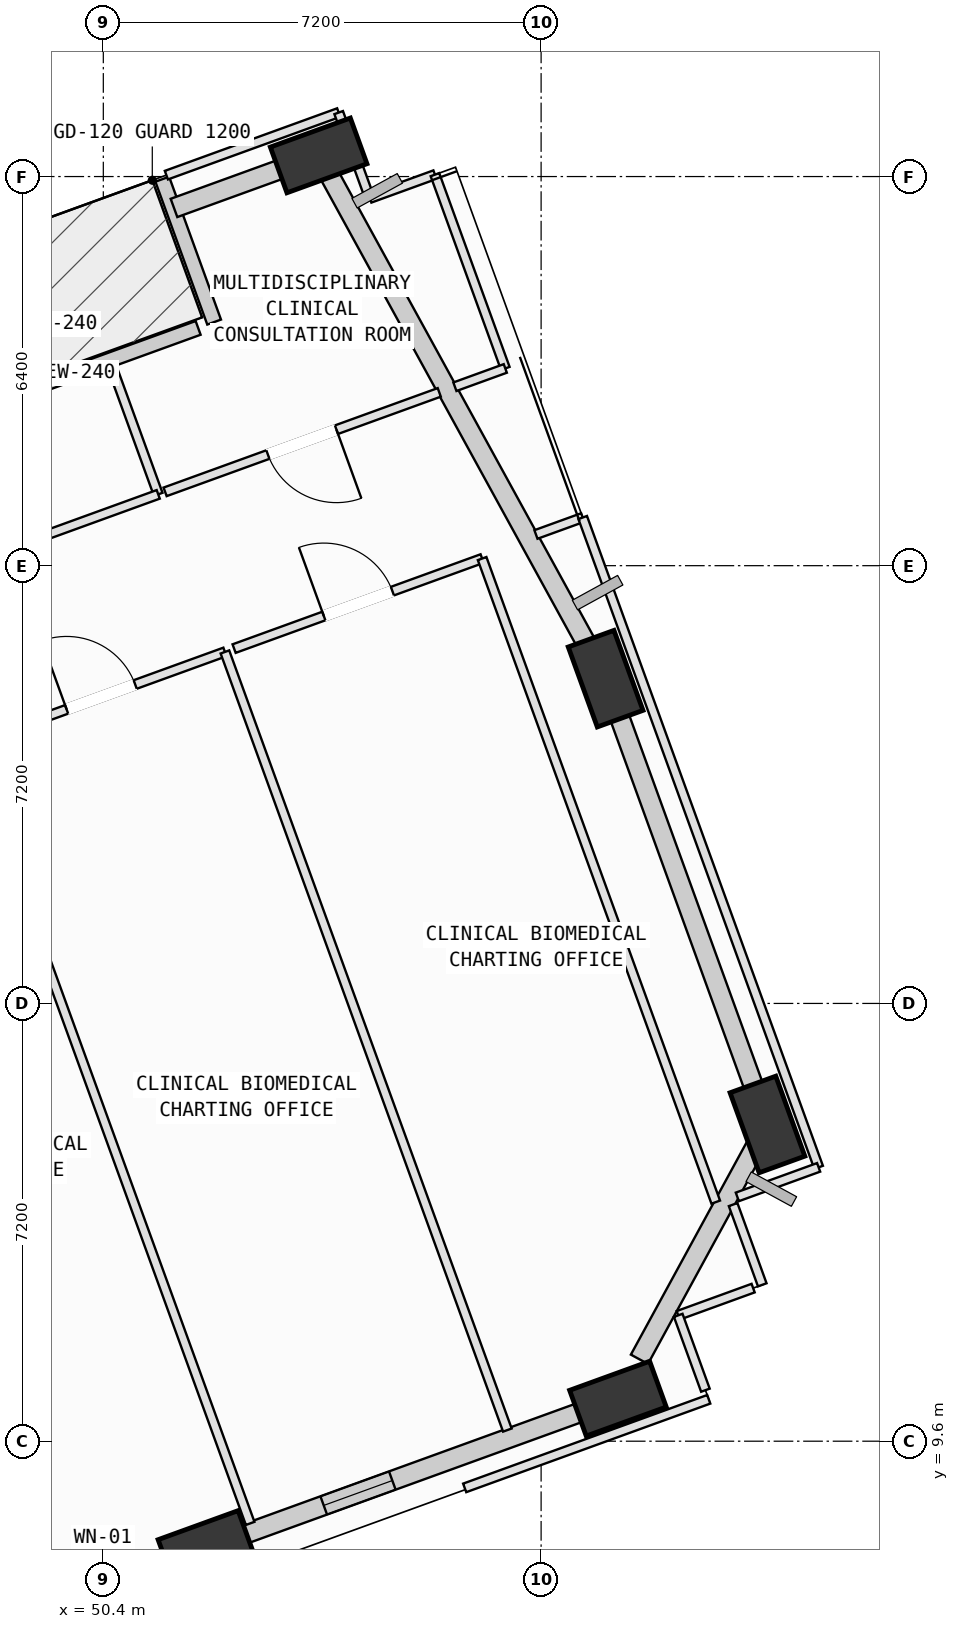
"""IFC4 building model, lengths in metres.
Left out: names, types, materials, properties, quantities, classifications, styles, units other than length and angle.
Written with IfcOpenShell. Run it as: python <this file> out.ifc"""

import sys

from ifc_helpers import new_model, si_unit, direction, frame, frame_2d, origin, origin_2d, place, context, subcontext, project, spatial, rectangle, extrude, element, fill, save


model = new_model("IFC4")
c1 = context("Model", 3, precision=1e-05, world=origin(), true_north=direction((0.0, 1.0)))
c2 = subcontext(c1, "Body", "Model", "MODEL_VIEW")
j1 = project(units=[si_unit("LENGTHUNIT", "METRE"), si_unit("PLANEANGLEUNIT", "RADIAN")], contexts=[c1])
p1 = place(None, origin())
s1 = spatial("IfcSite", under=j1, at=p1, CompositionType="ELEMENT")
p2 = place(p1, origin())
s2 = spatial("IfcBuilding", under=s1, at=p2, CompositionType="ELEMENT")
p3 = place(p2, frame((0.0, 0.0, 108.4)))
s3 = spatial("IfcBuildingStorey", under=s2, at=p3, CompositionType="ELEMENT", Elevation=108.4)
p4 = place(p3, frame((52.096, 7.843, 0.002), z_axis=(0.069270333832, 0.076805001722, 0.994636924994), x_axis=(-0.925321067949, 0.377538817765, 0.03528969099)))
e1 = element("IfcColumn", 1, at=p4, inside=s3, PredefinedType="COLUMN", context=c2, shape_type="SweptSolid", body=[
    extrude(rectangle(XDim=1.4, YDim=0.8, at=origin_2d()), origin(), (0.0, 0.0, 1.0), 4.018),
])
p5 = place(p3, frame((58.864, 10.3, 0.002), z_axis=(0.058831075792, 0.104440322179, 0.992789566638), x_axis=(-0.985243313153, 0.166201162188, 0.040899725852)))
e2 = element("IfcColumn", 2, at=p5, inside=s3, PredefinedType="COLUMN", context=c2, shape_type="SweptSolid", body=[
    extrude(rectangle(XDim=1.4, YDim=0.8, at=origin_2d()), origin(), (0.0, 0.0, 1.0), 4.025),
])
p6 = place(p3, frame((61.323, 14.81, 0.002), z_axis=(0.04014383957, 0.114428134848, 0.992620105629), x_axis=(0.013083017685, -0.993395925555, 0.113988463181)))
e3 = element("IfcColumn", 3, at=p6, inside=s3, PredefinedType="COLUMN", context=c2, shape_type="SweptSolid", body=[
    extrude(rectangle(XDim=1.4, YDim=0.8, at=origin_2d()), origin(), (0.0, 0.0, 1.0), 4.026),
])
p7 = place(p3, frame((58.661, 22.141, 0.002), z_axis=(0.010086228897, 0.103414226406, 0.994587233863), x_axis=(0.248836012635, -0.96360846528, 0.097669670096)))
e4 = element("IfcColumn", 4, at=p7, inside=s3, PredefinedType="COLUMN", context=c2, shape_type="SweptSolid", body=[
    extrude(rectangle(XDim=1.4, YDim=0.8, at=origin_2d()), origin(), (0.0, 0.0, 1.0), 4.018),
])
p8 = place(p3, frame((53.941, 30.748, 0.002), z_axis=(-0.025255510394, 0.083799609187, 0.996162529257), x_axis=(-0.801926584814, -0.596675766254, 0.029862728171)))
e5 = element("IfcColumn", 5, at=p8, inside=s3, PredefinedType="COLUMN", context=c2, shape_type="SweptSolid", body=[
    extrude(rectangle(XDim=1.4, YDim=0.8, at=origin_2d()), origin(), (0.0, 0.0, 1.0), 4.012),
])
p9 = place(p3, frame((45.417, 25.536, 0.0), z_axis=(0.0, 0.0, 1.0), x_axis=(0.939988887758, 0.341205056955, 0.0)))
e6 = element("IfcWall", 6, at=p9, inside=s3, PredefinedType="SOLIDWALL", context=c2, shape_type="SweptSolid", body=[
    extrude(rectangle(XDim=6.96, YDim=0.24, at=frame_2d((3.48, 0.0))), origin(), (0.0, 0.0, 1.0), 2.945),
])
p10 = place(p9, frame((2.263, 0.0, 0.0)))
e7 = element("IfcOpeningElement", 7, at=p10, cuts=e6, PredefinedType="OPENING", context=c2, shape_type="SweptSolid", body=[
    extrude(rectangle(XDim=1.1, YDim=2.15, at=frame_2d((0.55, 1.075))), frame((0.0, 0.13, 0.0), z_axis=(0.0, -1.0, 0.0), x_axis=(1.0, 0.0, 0.0)), (0.0, 0.0, 1.0), 0.26),
])
p11 = place(p3, frame((52.222, 28.006, 0.0), z_axis=(0.0, 0.0, 1.0), x_axis=(-0.341194160902, 0.939992842827, 0.0)))
e8 = element("IfcWall", 8, at=p11, inside=s3, PredefinedType="SOLIDWALL", context=c2, shape_type="SweptSolid", body=[
    extrude(rectangle(XDim=2.5, YDim=0.24, at=frame_2d((1.25, 0.0))), origin(), (0.0, 0.0, 1.0), 3.165),
])
p12 = place(p3, frame((51.811, 7.74, 0.0), z_axis=(0.0, 0.0, 1.0), x_axis=(-0.939992730325, -0.341194470846, 0.0)))
e9 = element("IfcWall", 9, at=p12, inside=s3, PredefinedType="SOLIDWALL", context=c2, shape_type="SweptSolid", body=[
    extrude(rectangle(XDim=6.218, YDim=0.32, at=frame_2d((3.109, 0.0))), origin(), (0.0, 0.0, 1.0), 3.165),
])
p13 = place(p12, frame((0.708, 0.0, 0.75)))
e10 = element("IfcOpeningElement", 10, at=p13, cuts=e9, PredefinedType="OPENING", context=c2, shape_type="SweptSolid", body=[
    extrude(rectangle(XDim=1.6, YDim=1.95, at=frame_2d((0.8, 0.975))), frame((0.0, 0.17, 0.0), z_axis=(0.0, -1.0, 0.0), x_axis=(1.0, 0.0, 0.0)), (0.0, 0.0, 1.0), 0.34),
])
p14 = place(p3, frame((58.593, 10.202, 0.0), z_axis=(0.0, 0.0, 1.0), x_axis=(-0.939989678863, -0.341202877524, 0.0)))
e11 = element("IfcWall", 11, at=p14, inside=s3, PredefinedType="SOLIDWALL", context=c2, shape_type="SweptSolid", body=[
    extrude(rectangle(XDim=6.242, YDim=0.32, at=frame_2d((3.121, 0.0))), origin(), (0.0, 0.0, 1.0), 3.165),
])
p15 = place(p14, frame((3.66, 0.0, 0.75)))
e12 = element("IfcOpeningElement", 12, at=p15, cuts=e11, PredefinedType="OPENING", context=c2, shape_type="SweptSolid", body=[
    extrude(rectangle(XDim=1.2, YDim=1.75, at=frame_2d((0.6, 0.875))), frame((0.0, 0.17, 0.0), z_axis=(0.0, -1.0, 0.0), x_axis=(1.0, 0.0, 0.0)), (0.0, 0.0, 1.0), 0.34),
])
p16 = place(p3, frame((61.201, 14.587, 0.0), z_axis=(0.0, 0.0, 1.0), x_axis=(-0.478691175665, -0.877983347417, 0.0)))
e13 = element("IfcWall", 13, at=p16, inside=s3, PredefinedType="SOLIDWALL", context=c2, shape_type="SweptSolid", body=[
    extrude(rectangle(XDim=4.145, YDim=0.32, at=frame_2d((2.073, 0.0))), origin(), (0.0, 0.0, 1.0), 3.165),
])
p17 = place(p3, frame((58.763, 21.86, 0.0), z_axis=(0.0, 0.0, 1.0), x_axis=(0.341195615614, -0.939992314802, 0.0)))
e14 = element("IfcWall", 14, at=p17, inside=s3, PredefinedType="SOLIDWALL", context=c2, shape_type="SweptSolid", body=[
    extrude(rectangle(XDim=6.84, YDim=0.32, at=frame_2d((3.42, 0.0))), origin(), (0.0, 0.0, 1.0), 3.165),
])
p18 = place(p3, frame((54.097, 30.464, 0.0), z_axis=(0.0, 0.0, 1.0), x_axis=(0.480836721767, -0.876810154481, 0.0)))
e15 = element("IfcWall", 15, at=p18, inside=s3, PredefinedType="SOLIDWALL", context=c2, shape_type="SweptSolid", body=[
    extrude(rectangle(XDim=8.838, YDim=0.32, at=frame_2d((4.419, 0.0))), origin(), (0.0, 0.0, 1.0), 3.165),
])
p19 = place(p3, frame((51.562, 29.884, 0.0), z_axis=(0.0, 0.0, 1.0), x_axis=(0.939992364917, 0.341195477547, 0.0)))
e16 = element("IfcWall", 16, at=p19, inside=s3, PredefinedType="SOLIDWALL", context=c2, shape_type="SweptSolid", body=[
    extrude(rectangle(XDim=2.076, YDim=0.32, at=frame_2d((1.038, 0.0))), origin(), (0.0, 0.0, 1.0), 2.945),
])
p20 = place(p3, frame((48.17, 21.046, 0.0), z_axis=(0.0, 0.0, 1.0), x_axis=(0.341175718881, -0.93999953662, 0.0)))
e17 = element("IfcWall", 17, at=p20, inside=s3, PredefinedType="PARTITIONING", context=c2, shape_type="SweptSolid", body=[
    extrude(rectangle(XDim=13.615, YDim=0.15, at=frame_2d((6.807, 0.0))), origin(), (0.0, 0.0, 1.0), 3.78),
])
p21 = place(p3, frame((52.804, 7.856, 0.0), z_axis=(0.0, 0.0, 1.0), x_axis=(-0.940027533904, -0.341098571534, 0.0)))
e18 = element("IfcWall", 18, at=p21, inside=s3, PredefinedType="PARTITIONING", context=c2, shape_type="SweptSolid", body=[
    extrude(rectangle(XDim=0.973, YDim=0.15, at=frame_2d((0.487, 0.0))), origin(), (0.0, 0.0, 1.0), 3.165),
])
p22 = place(p3, frame((48.321, 21.101, 0.0), z_axis=(0.0, 0.0, 1.0), x_axis=(0.940033040483, 0.341083395667, 0.0)))
e19 = element("IfcWall", 19, at=p22, inside=s3, PredefinedType="PARTITIONING", context=c2, shape_type="SweptSolid", body=[
    extrude(rectangle(XDim=4.339, YDim=0.15, at=frame_2d((2.169, 0.0))), origin(), (0.0, 0.0, 1.0), 3.78),
])
p23 = place(p22, frame((1.57, 0.0, 0.0)))
e20 = element("IfcOpeningElement", 20, at=p23, cuts=e19, PredefinedType="OPENING", context=c2, shape_type="SweptSolid", body=[
    extrude(rectangle(XDim=1.2, YDim=2.15, at=frame_2d((0.6, 1.075))), frame((0.0, 0.085, 0.0), z_axis=(0.0, -1.0, 0.0), x_axis=(1.0, 0.0, 0.0)), (0.0, 0.0, 1.0), 0.17),
])
p24 = place(p3, frame((52.4, 22.581, 0.0), z_axis=(0.0, 0.0, 1.0), x_axis=(0.341169968064, -0.940001623877, 0.0)))
e21 = element("IfcWall", 21, at=p24, inside=s3, PredefinedType="PARTITIONING", context=c2, shape_type="SweptSolid", body=[
    extrude(rectangle(XDim=13.615, YDim=0.15, at=frame_2d((6.808, 0.0))), origin(), (0.0, 0.0, 1.0), 3.78),
])
p25 = place(p3, frame((52.551, 22.636, 0.0), z_axis=(0.0, 0.0, 1.0), x_axis=(0.939960863027, 0.341282252656, 0.0)))
e22 = element("IfcWall", 22, at=p25, inside=s3, PredefinedType="PARTITIONING", context=c2, shape_type="SweptSolid", body=[
    extrude(rectangle(XDim=4.339, YDim=0.15, at=frame_2d((2.17, 0.0))), origin(), (0.0, 0.0, 1.0), 3.78),
])
p26 = place(p25, frame((1.57, 0.0, 0.0)))
e23 = element("IfcOpeningElement", 23, at=p26, cuts=e22, PredefinedType="OPENING", context=c2, shape_type="SweptSolid", body=[
    extrude(rectangle(XDim=1.2, YDim=2.15, at=frame_2d((0.6, 1.075))), frame((0.0, 0.085, 0.0), z_axis=(0.0, -1.0, 0.0), x_axis=(1.0, 0.0, 0.0)), (0.0, 0.0, 1.0), 0.17),
])
p27 = place(p3, frame((56.63, 24.117, 0.0), z_axis=(0.0, 0.0, 1.0), x_axis=(0.341191171741, -0.939993927813, 0.0)))
e24 = element("IfcWall", 24, at=p27, inside=s3, PredefinedType="PARTITIONING", context=c2, shape_type="SweptSolid", body=[
    extrude(rectangle(XDim=11.261, YDim=0.15, at=frame_2d((5.63, 0.0))), origin(), (0.0, 0.0, 1.0), 3.78),
])
p28 = place(p3, frame((61.087, 12.118, 0.0), z_axis=(0.0, 0.0, 1.0), x_axis=(-0.939787985584, -0.341758016953, 0.0)))
e25 = element("IfcWall", 25, at=p28, inside=s3, PredefinedType="PARTITIONING", context=c2, shape_type="SweptSolid", body=[
    extrude(rectangle(XDim=1.311, YDim=0.15, at=frame_2d((0.655, 0.0))), origin(), (0.0, 0.0, 1.0), 3.78),
])
p29 = place(p3, frame((59.855, 11.67, 0.0), z_axis=(0.0, 0.0, 1.0), x_axis=(0.341338890117, -0.93994029709, 0.0)))
e26 = element("IfcWall", 26, at=p29, inside=s3, PredefinedType="PARTITIONING", context=c2, shape_type="SweptSolid", body=[
    extrude(rectangle(XDim=1.31, YDim=0.15, at=frame_2d((0.655, 0.0))), origin(), (0.0, 0.0, 1.0), 3.78),
])
p30 = place(p3, frame((50.534, 27.292, 0.0), z_axis=(0.0, 0.0, 1.0), x_axis=(0.34116904795, -0.940001957828, 0.0)))
e27 = element("IfcWall", 27, at=p30, inside=s3, PredefinedType="PARTITIONING", context=c2, shape_type="SweptSolid", body=[
    extrude(rectangle(XDim=2.254, YDim=0.15, at=frame_2d((1.127, 0.0))), origin(), (0.0, 0.0, 1.0), 3.78),
])
p31 = place(p3, frame((51.303, 25.173, 0.0), z_axis=(0.0, 0.0, 1.0), x_axis=(-0.939937453114, -0.341346721434, 0.0)))
e28 = element("IfcWall", 28, at=p31, inside=s3, PredefinedType="PARTITIONING", context=c2, shape_type="SweptSolid", body=[
    extrude(rectangle(XDim=6.331, YDim=0.15, at=frame_2d((3.166, 0.0))), origin(), (0.0, 0.0, 1.0), 3.78),
])
p32 = place(p31, frame((2.706, 0.0, 0.0)))
e29 = element("IfcOpeningElement", 29, at=p32, cuts=e28, PredefinedType="OPENING", context=c2, shape_type="SweptSolid", body=[
    extrude(rectangle(XDim=0.92, YDim=2.1, at=frame_2d((0.46, 1.05))), frame((0.0, 0.085, 0.0), z_axis=(0.0, -1.0, 0.0), x_axis=(1.0, 0.0, 0.0)), (0.0, 0.0, 1.0), 0.17),
])
p33 = place(p3, frame((51.437, 30.423, 0.0), z_axis=(0.0, 0.0, 1.0), x_axis=(0.939977700779, 0.34123587449, 0.0)))
e30 = element("IfcWall", 30, at=p33, inside=s3, PredefinedType="PARTITIONING", context=c2, shape_type="SweptSolid", body=[
    extrude(rectangle(XDim=3.015, YDim=0.15, at=frame_2d((1.507, 0.0))), origin(), (0.0, 0.0, 1.0), 2.945),
])
p34 = place(p3, frame((54.271, 31.452, 0.0), z_axis=(0.0, 0.0, 1.0), x_axis=(0.341311767392, -0.939950146252, 0.0)))
e31 = element("IfcWall", 31, at=p34, inside=s3, PredefinedType="PARTITIONING", context=c2, shape_type="SweptSolid", body=[
    extrude(rectangle(XDim=1.5, YDim=0.15, at=frame_2d((0.75, 0.0))), origin(), (0.0, 0.0, 1.0), 3.165),
])
p35 = place(p3, frame((54.783, 30.042, 0.0), z_axis=(0.0, 0.0, 1.0), x_axis=(0.939949717759, 0.341312947433, 0.0)))
e32 = element("IfcWall", 32, at=p35, inside=s3, PredefinedType="PARTITIONING", context=c2, shape_type="SweptSolid", body=[
    extrude(rectangle(XDim=1.139, YDim=0.15, at=frame_2d((0.57, 0.0))), origin(), (0.0, 0.0, 1.0), 3.78),
])
p36 = place(p3, frame((55.854, 30.431, 0.0), z_axis=(0.0, 0.0, 1.0), x_axis=(0.341240018038, -0.939976196555, 0.0)))
e33 = element("IfcWall", 33, at=p36, inside=s3, PredefinedType="PARTITIONING", context=c2, shape_type="SweptSolid", body=[
    extrude(rectangle(XDim=3.391, YDim=0.15, at=frame_2d((1.695, 0.0))), origin(), (0.0, 0.0, 1.0), 3.78),
])
p37 = place(p3, frame((57.011, 27.244, 0.0), z_axis=(0.0, 0.0, 1.0), x_axis=(-0.940051781149, -0.341031741571, 0.0)))
e34 = element("IfcWall", 34, at=p37, inside=s3, PredefinedType="PARTITIONING", context=c2, shape_type="SweptSolid", body=[
    extrude(rectangle(XDim=0.882, YDim=0.15, at=frame_2d((0.441, 0.0))), origin(), (0.0, 0.0, 1.0), 3.78),
])
p38 = place(p3, frame((55.925, 26.85, 0.0), z_axis=(0.0, 0.0, 1.0), x_axis=(-0.940038384463, -0.341068667187, 0.0)))
e35 = element("IfcWall", 35, at=p38, inside=s3, PredefinedType="PARTITIONING", context=c2, shape_type="SweptSolid", body=[
    extrude(rectangle(XDim=4.797, YDim=0.15, at=frame_2d((2.398, 0.0))), origin(), (0.0, 0.0, 1.0), 3.78),
])
p39 = place(p38, frame((1.798, 0.0, 0.0)))
e36 = element("IfcOpeningElement", 36, at=p39, cuts=e35, PredefinedType="OPENING", context=c2, shape_type="SweptSolid", body=[
    extrude(rectangle(XDim=1.2, YDim=2.15, at=frame_2d((0.6, 1.075))), frame((0.0, 0.085, 0.0), z_axis=(0.0, -1.0, 0.0), x_axis=(1.0, 0.0, 0.0)), (0.0, 0.0, 1.0), 0.17),
])
p40 = place(p3, frame((60.357, 10.289, 0.0), z_axis=(0.0, 0.0, 1.0), x_axis=(-0.939986910804, -0.341210503234, 0.0)))
e37 = element("IfcWall", 37, at=p40, inside=s3, PredefinedType="PARTITIONING", context=c2, shape_type="SweptSolid", body=[
    extrude(rectangle(XDim=4.27, YDim=0.15, at=frame_2d((2.135, 0.0))), origin(), (0.0, 0.0, 1.0), 3.78),
])
p41 = place(p3, frame((60.758, 13.492, 0.0), z_axis=(0.0, 0.0, 1.0), x_axis=(0.341156620536, -0.940006468204, 0.0)))
e38 = element("IfcWall", 38, at=p41, inside=s3, PredefinedType="PARTITIONING", context=c2, shape_type="SweptSolid", body=[
    extrude(rectangle(XDim=1.404, YDim=0.15, at=frame_2d((0.702, 0.0))), origin(), (0.0, 0.0, 1.0), 3.78),
])
p42 = place(p3, frame((57.515, 24.513, 0.0), z_axis=(0.0, 0.0, 1.0), x_axis=(0.940028452982, 0.341096038653, 0.0)))
e39 = element("IfcWall", 39, at=p42, inside=s3, PredefinedType="PARTITIONING", context=c2, shape_type="SweptSolid", body=[
    extrude(rectangle(XDim=0.818, YDim=0.15, at=frame_2d((0.409, 0.0))), origin(), (0.0, 0.0, 1.0), 3.78),
])
p43 = place(p3, frame((58.284, 24.792, 0.0), z_axis=(0.0, 0.0, 1.0), x_axis=(0.341244784803, -0.93997446606, 0.0)))
e40 = element("IfcWall", 40, at=p43, inside=s3, PredefinedType="PARTITIONING", context=c2, shape_type="SweptSolid", body=[
    extrude(rectangle(XDim=11.371, YDim=0.15, at=frame_2d((5.685, 0.0))), origin(), (0.0, 0.0, 1.0), 3.165),
])
p44 = place(p3, frame((62.164, 14.104, 0.0), z_axis=(0.0, 0.0, 1.0), x_axis=(-0.93982848915, -0.341646617108, 0.0)))
e41 = element("IfcWall", 41, at=p44, inside=s3, PredefinedType="PARTITIONING", context=c2, shape_type="SweptSolid", body=[
    extrude(rectangle(XDim=1.423, YDim=0.15, at=frame_2d((0.711, 0.0))), origin(), (0.0, 0.0, 1.0), 3.78),
])
p45 = place(p15, origin())
e42 = element("IfcWindow", 42, at=p45, inside=s3, PartitioningType="SINGLE_PANEL", PredefinedType="WINDOW", context=c2, shape_type="SweptSolid", body=[
    extrude(rectangle(XDim=1.2, YDim=1.75, at=frame_2d((0.6, 0.875))), frame((0.0, 0.03, 0.0), z_axis=(0.0, -1.0, 0.0), x_axis=(1.0, 0.0, 0.0)), (0.0, 0.0, 1.0), 0.06),
])
fill(e12, e42)
p46 = place(p23, origin())
e43 = element("IfcDoor", 43, at=p46, inside=s3, OperationType="SINGLE_SWING_LEFT", PredefinedType="DOOR", context=c2, shape_type="SweptSolid", body=[
    extrude(rectangle(XDim=1.2, YDim=2.15, at=frame_2d((0.6, 1.075))), frame((0.0, 0.025, 0.0), z_axis=(0.0, -1.0, 0.0), x_axis=(1.0, 0.0, 0.0)), (0.0, 0.0, 1.0), 0.05),
])
fill(e20, e43)
p47 = place(p26, origin())
e44 = element("IfcDoor", 44, at=p47, inside=s3, OperationType="SINGLE_SWING_LEFT", PredefinedType="DOOR", context=c2, shape_type="SweptSolid", body=[
    extrude(rectangle(XDim=1.2, YDim=2.15, at=frame_2d((0.6, 1.075))), frame((0.0, 0.025, 0.0), z_axis=(0.0, -1.0, 0.0), x_axis=(1.0, 0.0, 0.0)), (0.0, 0.0, 1.0), 0.05),
])
fill(e23, e44)
p48 = place(p39, origin())
e45 = element("IfcDoor", 45, at=p48, inside=s3, OperationType="SINGLE_SWING_LEFT", PredefinedType="DOOR", context=c2, shape_type="SweptSolid", body=[
    extrude(rectangle(XDim=1.2, YDim=2.15, at=frame_2d((0.6, 1.075))), frame((0.0, 0.025, 0.0), z_axis=(0.0, -1.0, 0.0), x_axis=(1.0, 0.0, 0.0)), (0.0, 0.0, 1.0), 0.05),
])
fill(e36, e45)
save(model, sys.argv[1])
